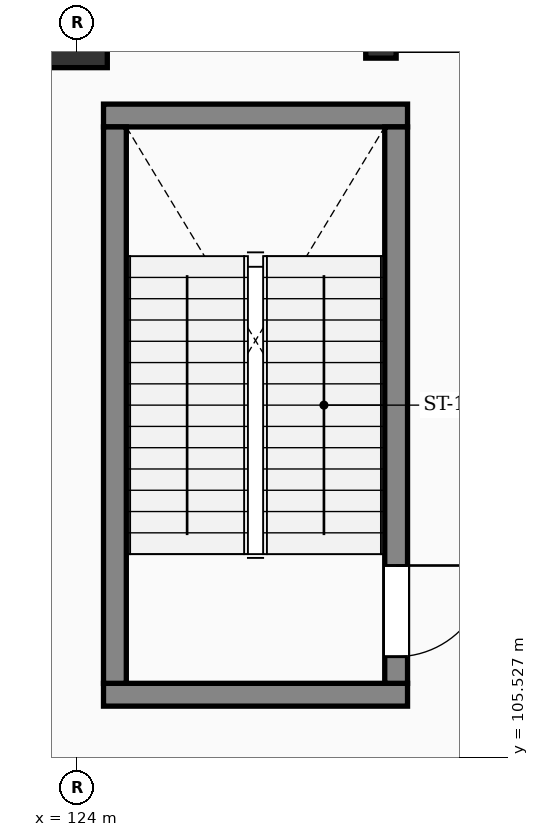
"""IFC4 building model, lengths in metres.
Left out: names, types, materials, properties, quantities, classifications, styles, units other than length and angle.
Written with IfcOpenShell. Run it as: python <this file> out.ifc"""

import sys

from ifc_helpers import new_model, si_unit, direction, frame, frame_2d, origin, origin_2d, place, context, subcontext, project, spatial, rectangle, extrude, element, fill, save


model = new_model("IFC4")
c1 = context("Model", 3, precision=1e-05, world=origin(), true_north=direction((0.0, 1.0)))
c2 = subcontext(c1, "Body", "Model", "MODEL_VIEW")
j1 = project(units=[si_unit("LENGTHUNIT", "METRE"), si_unit("PLANEANGLEUNIT", "RADIAN")], contexts=[c1])
p1 = place(None, origin())
s1 = spatial("IfcSite", under=j1, at=p1, CompositionType="ELEMENT")
p2 = place(p1, origin())
s2 = spatial("IfcBuilding", under=s1, at=p2, CompositionType="ELEMENT")
p3 = place(p2, origin())
s3 = spatial("IfcBuildingStorey", under=s2, at=p3, CompositionType="ELEMENT", Elevation=0.0)
p4 = place(p3, frame((124.0, 115.0, 0.0), z_axis=(0.0, 0.0, 1.0), x_axis=(1.0, 0.0, 0.0)))
e1 = element("IfcColumn", 1, at=p4, inside=s3, PredefinedType="COLUMN", context=c2, shape_type="SweptSolid", body=[
    extrude(rectangle(XDim=0.8, YDim=0.8, at=origin_2d()), origin(), (0.0, 0.0, 1.0), 4.8),
])
p5 = place(p3, frame((128.0, 115.0, 0.0), z_axis=(0.0, 0.0, 1.0), x_axis=(1.0, 0.0, 0.0)))
e2 = element("IfcColumn", 2, at=p5, inside=s3, PredefinedType="PILASTER", context=c2, shape_type="SweptSolid", body=[
    extrude(rectangle(XDim=0.4, YDim=0.55, at=origin_2d()), origin(), (0.0, 0.0, 1.0), 4.8),
])
for number, where, z_axis, x_axis in (
    (3, (124.35, 106.35, 0.0), (0.0, 0.0, 1.0), (1.0, 0.0, 0.0)),
    (4, (128.35, 113.97, 0.0), (0.0, 0.0, 1.0), (-1.0, 0.0, 0.0)),
):
    element("IfcWall", number, at=place(p3, frame(where, z_axis=z_axis, x_axis=x_axis)), inside=s3, PredefinedType="SHEAR", context=c2, shape_type="SweptSolid", body=[
        extrude(rectangle(XDim=4.0, YDim=0.3, at=frame_2d((2.0, 0.0))), origin(), (0.0, 0.0, 1.0), 4.55),
    ])
p6 = place(p3, frame((124.5, 106.5, 0.0), z_axis=(0.0, 0.0, 1.0), x_axis=(0.0, 1.0, 0.0)))
e5 = element("IfcWall", 5, at=p6, inside=s3, PredefinedType="SHEAR", context=c2, shape_type="SweptSolid", body=[
    extrude(rectangle(XDim=7.32, YDim=0.3, at=frame_2d((3.66, 0.0))), origin(), (0.0, 0.0, 1.0), 4.55),
])
p7 = place(p3, frame((128.2, 113.82, 0.0), z_axis=(0.0, 0.0, 1.0), x_axis=(0.0, -1.0, 0.0)))
e6 = element("IfcWall", 6, at=p7, inside=s3, PredefinedType="SHEAR", context=c2, shape_type="SweptSolid", body=[
    extrude(rectangle(XDim=7.32, YDim=0.3, at=frame_2d((3.66, 0.0))), origin(), (0.0, 0.0, 1.0), 4.55),
])
p8 = place(p7, frame((5.77, 0.0, 0.0)))
e7 = element("IfcOpeningElement", 7, at=p8, cuts=e6, PredefinedType="OPENING", context=c2, shape_type="SweptSolid", body=[
    extrude(rectangle(XDim=1.2, YDim=2.15, at=frame_2d((0.6, 1.075))), frame((0.0, 0.16, 0.0), z_axis=(0.0, -1.0, 0.0), x_axis=(1.0, 0.0, 0.0)), (0.0, 0.0, 1.0), 0.32),
])
p9 = place(p8, origin())
e8 = element("IfcDoor", 8, at=p9, inside=s3, OperationType="SINGLE_SWING_LEFT", PredefinedType="DOOR", context=c2, shape_type="SweptSolid", body=[
    extrude(rectangle(XDim=1.2, YDim=2.15, at=frame_2d((0.6, 1.075))), frame((0.0, 0.025, 0.0), z_axis=(0.0, -1.0, 0.0), x_axis=(1.0, 0.0, 0.0)), (0.0, 0.0, 1.0), 0.05),
])
fill(e7, e8)
save(model, sys.argv[1])
